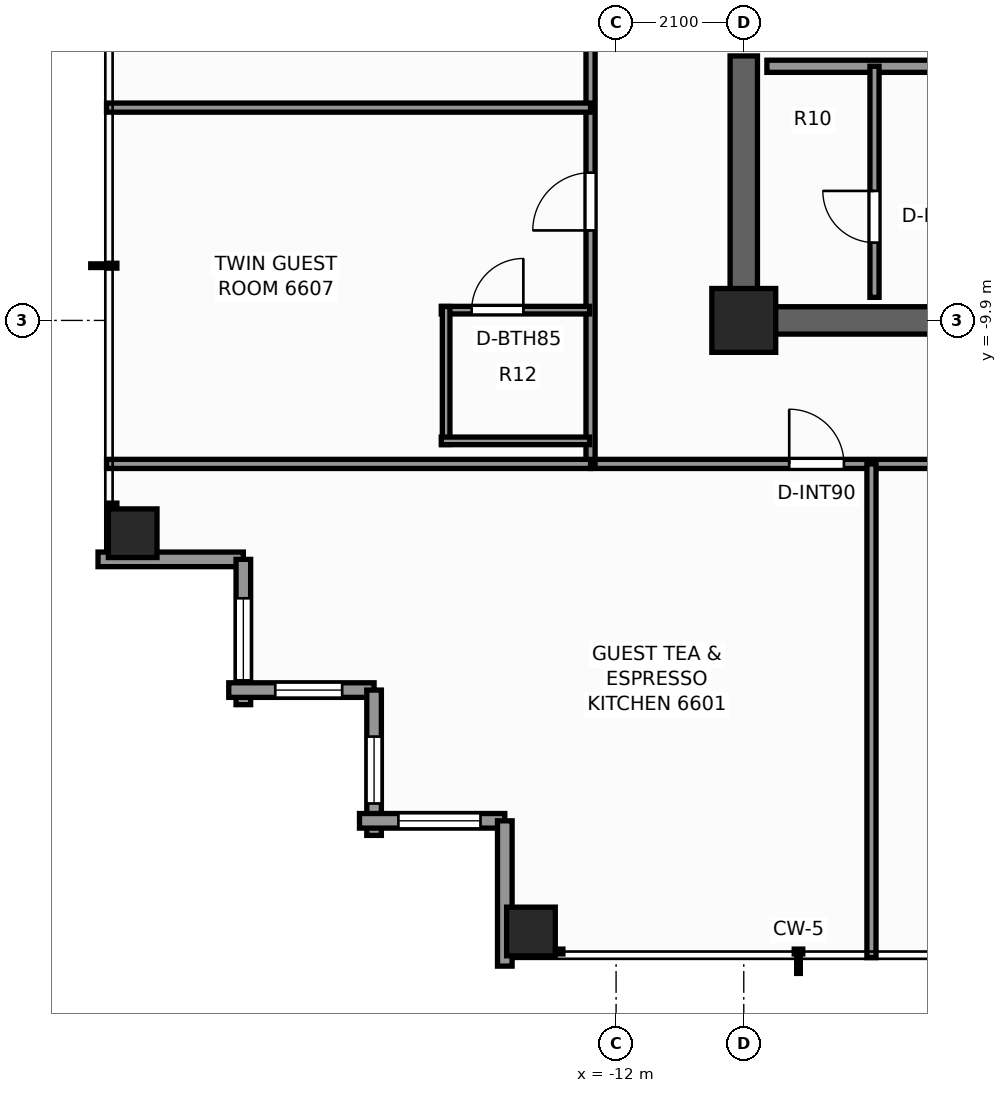
"""IFC4 building model, lengths in metres.
Left out: names, types, materials, properties, quantities, classifications, styles, units other than length and angle.
Written with IfcOpenShell. Run it as: python <this file> out.ifc"""

import sys

from ifc_helpers import new_model, si_unit, direction, frame, frame_2d, origin, origin_2d, place, context, subcontext, project, spatial, rectangle, extrude, element, fill, save


model = new_model("IFC4")
c1 = context("Model", 3, precision=1e-05, world=origin(), true_north=direction((0.0, 1.0)))
c2 = subcontext(c1, "Body", "Model", "MODEL_VIEW")
j1 = project(units=[si_unit("LENGTHUNIT", "METRE"), si_unit("PLANEANGLEUNIT", "RADIAN")], contexts=[c1])
p1 = place(None, origin())
s1 = spatial("IfcSite", under=j1, at=p1, CompositionType="ELEMENT")
p2 = place(p1, origin())
s2 = spatial("IfcBuilding", under=s1, at=p2, CompositionType="ELEMENT")
p3 = place(p2, frame((0.0, 0.0, 226.2)))
s3 = spatial("IfcBuildingStorey", under=s2, at=p3, CompositionType="ELEMENT", Elevation=226.2)
p4 = place(p3, frame((-3.54, -9.9, 0.0), z_axis=(0.0, 0.0, 1.0), x_axis=(-1.0, 0.0, 0.0)))
e1 = element("IfcWall", 1, at=p4, inside=s3, PredefinedType="SHEAR", context=c2, shape_type="SweptSolid", body=[
    extrude(rectangle(XDim=6.585, YDim=0.45, at=frame_2d((3.292, 0.0))), origin(), (0.0, 0.0, 1.0), 3.3),
])
p5 = place(p3, frame((-9.9, -9.675, 0.0), z_axis=(0.0, 0.0, 1.0), x_axis=(0.0, 1.0, 0.0)))
e2 = element("IfcWall", 2, at=p5, inside=s3, PredefinedType="SHEAR", context=c2, shape_type="SweptSolid", body=[
    extrude(rectangle(XDim=4.125, YDim=0.45, at=frame_2d((2.062, 0.0))), origin(), (0.0, 0.0, 1.0), 3.3),
])
p6 = place(p3, frame((-9.9, -9.9, 0.0), z_axis=(0.0, 0.0, 1.0), x_axis=(1.0, 0.0, 0.0)))
e3 = element("IfcColumn", 3, at=p6, inside=s3, PredefinedType="COLUMN", context=c2, shape_type="SweptSolid", body=[
    extrude(rectangle(XDim=1.05, YDim=1.05, at=origin_2d()), origin(), (0.0, 0.0, 1.0), 3.3),
])
for number, where, z_axis, x_axis in (
    (4, (-13.4, -19.95, 0.0), (0.0, 0.0, 1.0), (1.0, 0.0, 0.0)),
    (5, (-19.95, -13.4, 0.0), (0.0, 0.0, 1.0), (1.0, 0.0, 0.0)),
):
    element("IfcColumn", number, at=place(p3, frame(where, z_axis=z_axis, x_axis=x_axis)), inside=s3, PredefinedType="COLUMN", context=c2, shape_type="SweptSolid", body=[
        extrude(rectangle(XDim=0.8, YDim=0.8, at=origin_2d()), origin(), (0.0, 0.0, 1.0), 3.3),
    ])
p7 = place(p3, frame((-18.13, -13.83, 0.0), z_axis=(0.0, 0.0, 1.0), x_axis=(-1.0, 0.0, 0.0)))
e6 = element("IfcWall", 6, at=p7, inside=s3, PredefinedType="STANDARD", context=c2, shape_type="SweptSolid", body=[
    extrude(rectangle(XDim=2.39, YDim=0.24, at=frame_2d((1.195, 0.0))), origin(), (0.0, 0.0, 1.0), 2.463),
])
p8 = place(p3, frame((-18.13, -16.22, 0.0), z_axis=(0.0, 0.0, 1.0), x_axis=(0.0, 1.0, 0.0)))
e7 = element("IfcWall", 7, at=p8, inside=s3, PredefinedType="STANDARD", context=c2, shape_type="SweptSolid", body=[
    extrude(rectangle(XDim=2.39, YDim=0.24, at=frame_2d((1.195, 0.0))), origin(), (0.0, 0.0, 1.0), 2.463),
])
p9 = place(p8, frame((0.4, 0.0, 0.65)))
e8 = element("IfcOpeningElement", 8, at=p9, cuts=e7, PredefinedType="OPENING", context=c2, shape_type="SweptSolid", body=[
    extrude(rectangle(XDim=1.35, YDim=1.55, at=frame_2d((0.675, 0.775))), frame((0.0, 0.13, 0.0), z_axis=(0.0, -1.0, 0.0), x_axis=(1.0, 0.0, 0.0)), (0.0, 0.0, 1.0), 0.26),
])
p10 = place(p3, frame((-15.98, -15.98, 0.0), z_axis=(0.0, 0.0, 1.0), x_axis=(-1.0, 0.0, 0.0)))
e9 = element("IfcWall", 9, at=p10, inside=s3, PredefinedType="STANDARD", context=c2, shape_type="SweptSolid", body=[
    extrude(rectangle(XDim=2.39, YDim=0.24, at=frame_2d((1.195, 0.0))), origin(), (0.0, 0.0, 1.0), 2.463),
])
p11 = place(p10, frame((0.525, 0.0, 0.65)))
e10 = element("IfcOpeningElement", 10, at=p11, cuts=e9, PredefinedType="OPENING", context=c2, shape_type="SweptSolid", body=[
    extrude(rectangle(XDim=1.1, YDim=1.45, at=frame_2d((0.55, 0.725))), frame((0.0, 0.13, 0.0), z_axis=(0.0, -1.0, 0.0), x_axis=(1.0, 0.0, 0.0)), (0.0, 0.0, 1.0), 0.26),
])
p12 = place(p3, frame((-15.98, -18.37, 0.0), z_axis=(0.0, 0.0, 1.0), x_axis=(0.0, 1.0, 0.0)))
e11 = element("IfcWall", 11, at=p12, inside=s3, PredefinedType="STANDARD", context=c2, shape_type="SweptSolid", body=[
    extrude(rectangle(XDim=2.39, YDim=0.24, at=frame_2d((1.195, 0.0))), origin(), (0.0, 0.0, 1.0), 2.463),
])
p13 = place(p12, frame((0.525, 0.0, 0.65)))
e12 = element("IfcOpeningElement", 12, at=p13, cuts=e11, PredefinedType="OPENING", context=c2, shape_type="SweptSolid", body=[
    extrude(rectangle(XDim=1.1, YDim=1.45, at=frame_2d((0.55, 0.725))), frame((0.0, 0.13, 0.0), z_axis=(0.0, -1.0, 0.0), x_axis=(1.0, 0.0, 0.0)), (0.0, 0.0, 1.0), 0.26),
])
p14 = place(p3, frame((-13.83, -18.13, 0.0), z_axis=(0.0, 0.0, 1.0), x_axis=(-1.0, 0.0, 0.0)))
e13 = element("IfcWall", 13, at=p14, inside=s3, PredefinedType="STANDARD", context=c2, shape_type="SweptSolid", body=[
    extrude(rectangle(XDim=2.39, YDim=0.24, at=frame_2d((1.195, 0.0))), origin(), (0.0, 0.0, 1.0), 2.463),
])
p15 = place(p14, frame((0.4, 0.0, 0.65)))
e14 = element("IfcOpeningElement", 14, at=p15, cuts=e13, PredefinedType="OPENING", context=c2, shape_type="SweptSolid", body=[
    extrude(rectangle(XDim=1.35, YDim=1.55, at=frame_2d((0.675, 0.775))), frame((0.0, 0.13, 0.0), z_axis=(0.0, -1.0, 0.0), x_axis=(1.0, 0.0, 0.0)), (0.0, 0.0, 1.0), 0.26),
])
p16 = place(p3, frame((-13.83, -20.52, 0.0), z_axis=(0.0, 0.0, 1.0), x_axis=(0.0, 1.0, 0.0)))
e15 = element("IfcWall", 15, at=p16, inside=s3, PredefinedType="STANDARD", context=c2, shape_type="SweptSolid", body=[
    extrude(rectangle(XDim=2.39, YDim=0.24, at=frame_2d((1.195, 0.0))), origin(), (0.0, 0.0, 1.0), 2.463),
])
p17 = place(p3, frame((-9.52, -5.72, 0.0), z_axis=(0.0, 0.0, 1.0), x_axis=(1.0, 0.0, 0.0)))
e16 = element("IfcWall", 16, at=p17, inside=s3, PredefinedType="SOLIDWALL", context=c2, shape_type="SweptSolid", body=[
    extrude(rectangle(XDim=5.66, YDim=0.2, at=frame_2d((2.83, 0.0))), origin(), (0.0, 0.0, 1.0), 3.08),
])
p18 = place(p17, frame((2.8, 0.0, 0.0)))
e17 = element("IfcOpeningElement", 17, at=p18, cuts=e16, PredefinedType="OPENING", context=c2, shape_type="SweptSolid", body=[
    extrude(rectangle(XDim=0.95, YDim=2.06, at=frame_2d((0.475, 1.03))), frame((0.0, 0.11, 0.0), z_axis=(0.0, -1.0, 0.0), x_axis=(1.0, 0.0, 0.0)), (0.0, 0.0, 1.0), 0.22),
])
p19 = place(p3, frame((-7.75, -9.52, 0.0), z_axis=(0.0, 0.0, 1.0), x_axis=(0.0, 1.0, 0.0)))
e18 = element("IfcWall", 18, at=p19, inside=s3, PredefinedType="PARTITIONING", context=c2, shape_type="SweptSolid", body=[
    extrude(rectangle(XDim=3.8, YDim=0.15, at=frame_2d((1.9, 0.0))), origin(), (0.0, 0.0, 1.0), 3.08),
])
p20 = place(p19, frame((0.9, 0.0, 0.0)))
e19 = element("IfcOpeningElement", 19, at=p20, cuts=e18, PredefinedType="OPENING", context=c2, shape_type="SweptSolid", body=[
    extrude(rectangle(XDim=0.85, YDim=2.03, at=frame_2d((0.425, 1.015))), frame((0.0, 0.085, 0.0), z_axis=(0.0, -1.0, 0.0), x_axis=(1.0, 0.0, 0.0)), (0.0, 0.0, 1.0), 0.17),
])
p21 = place(p3, frame((-12.42, -12.26, 0.0), z_axis=(0.0, 0.0, 1.0), x_axis=(1.0, 0.0, 0.0)))
e20 = element("IfcWall", 20, at=p21, inside=s3, PredefinedType="PARTITIONING", context=c2, shape_type="SweptSolid", body=[
    extrude(rectangle(XDim=24.68, YDim=0.15, at=frame_2d((12.34, 0.0))), origin(), (0.0, 0.0, 1.0), 2.369),
])
p22 = place(p21, frame((3.267, 0.0, 0.0)))
e21 = element("IfcOpeningElement", 21, at=p22, cuts=e20, PredefinedType="OPENING", context=c2, shape_type="SweptSolid", body=[
    extrude(rectangle(XDim=0.9, YDim=2.06, at=frame_2d((0.45, 1.03))), frame((0.0, 0.085, 0.0), z_axis=(0.0, -1.0, 0.0), x_axis=(1.0, 0.0, 0.0)), (0.0, 0.0, 1.0), 0.17),
])
p23 = place(p21, frame((9.94, 0.0, 0.0)))
e22 = element("IfcOpeningElement", 22, at=p23, cuts=e20, PredefinedType="OPENING", context=c2, shape_type="SweptSolid", body=[
    extrude(rectangle(XDim=0.9, YDim=2.06, at=frame_2d((0.45, 1.03))), frame((0.0, 0.085, 0.0), z_axis=(0.0, -1.0, 0.0), x_axis=(1.0, 0.0, 0.0)), (0.0, 0.0, 1.0), 0.17),
])
p24 = place(p21, frame((15.177, 0.0, 0.0)))
e23 = element("IfcOpeningElement", 23, at=p24, cuts=e20, PredefinedType="OPENING", context=c2, shape_type="SweptSolid", body=[
    extrude(rectangle(XDim=0.9, YDim=2.06, at=frame_2d((0.45, 1.03))), frame((0.0, 0.085, 0.0), z_axis=(0.0, -1.0, 0.0), x_axis=(1.0, 0.0, 0.0)), (0.0, 0.0, 1.0), 0.17),
])
p25 = place(p21, frame((18.4, 0.0, 0.0)))
e24 = element("IfcOpeningElement", 24, at=p25, cuts=e20, PredefinedType="OPENING", context=c2, shape_type="SweptSolid", body=[
    extrude(rectangle(XDim=0.95, YDim=2.06, at=frame_2d((0.475, 1.03))), frame((0.0, 0.085, 0.0), z_axis=(0.0, -1.0, 0.0), x_axis=(1.0, 0.0, 0.0)), (0.0, 0.0, 1.0), 0.17),
])
p26 = place(p21, frame((20.85, 0.0, 0.0)))
e25 = element("IfcOpeningElement", 25, at=p26, cuts=e20, PredefinedType="OPENING", context=c2, shape_type="SweptSolid", body=[
    extrude(rectangle(XDim=0.9, YDim=2.06, at=frame_2d((0.45, 1.03))), frame((0.0, 0.085, 0.0), z_axis=(0.0, -1.0, 0.0), x_axis=(1.0, 0.0, 0.0)), (0.0, 0.0, 1.0), 0.17),
])
p27 = place(p3, frame((-12.42, -12.26, 0.0), z_axis=(0.0, 0.0, 1.0), x_axis=(0.0, 1.0, 0.0)))
e26 = element("IfcWall", 26, at=p27, inside=s3, PredefinedType="PARTITIONING", context=c2, shape_type="SweptSolid", body=[
    extrude(rectangle(XDim=24.84, YDim=0.15, at=frame_2d((12.42, 0.0))), origin(), (0.0, 0.0, 1.0), 2.369),
])
p28 = place(p27, frame((3.84, 0.0, 0.0)))
e27 = element("IfcOpeningElement", 27, at=p28, cuts=e26, PredefinedType="OPENING", context=c2, shape_type="SweptSolid", body=[
    extrude(rectangle(XDim=0.95, YDim=2.06, at=frame_2d((0.475, 1.03))), frame((0.0, 0.085, 0.0), z_axis=(0.0, -1.0, 0.0), x_axis=(1.0, 0.0, 0.0)), (0.0, 0.0, 1.0), 0.17),
])
p29 = place(p27, frame((9.738, 0.0, 0.0)))
e28 = element("IfcOpeningElement", 28, at=p29, cuts=e26, PredefinedType="OPENING", context=c2, shape_type="SweptSolid", body=[
    extrude(rectangle(XDim=0.95, YDim=2.06, at=frame_2d((0.475, 1.03))), frame((0.0, 0.085, 0.0), z_axis=(0.0, -1.0, 0.0), x_axis=(1.0, 0.0, 0.0)), (0.0, 0.0, 1.0), 0.17),
])
p30 = place(p27, frame((19.32, 0.0, 0.0)))
e29 = element("IfcOpeningElement", 29, at=p30, cuts=e26, PredefinedType="OPENING", context=c2, shape_type="SweptSolid", body=[
    extrude(rectangle(XDim=0.95, YDim=2.06, at=frame_2d((0.475, 1.03))), frame((0.0, 0.085, 0.0), z_axis=(0.0, -1.0, 0.0), x_axis=(1.0, 0.0, 0.0)), (0.0, 0.0, 1.0), 0.17),
])
p31 = place(p3, frame((-20.38, -12.26, 0.0), z_axis=(0.0, 0.0, 1.0), x_axis=(1.0, 0.0, 0.0)))
e30 = element("IfcWall", 30, at=p31, inside=s3, PredefinedType="PARTITIONING", context=c2, shape_type="SweptSolid", body=[
    extrude(rectangle(XDim=7.96, YDim=0.15, at=frame_2d((3.98, 0.0))), origin(), (0.0, 0.0, 1.0), 2.369),
])
p32 = place(p3, frame((-7.8, -20.38, 0.0), z_axis=(0.0, 0.0, 1.0), x_axis=(0.0, 1.0, 0.0)))
e31 = element("IfcWall", 31, at=p32, inside=s3, PredefinedType="PARTITIONING", context=c2, shape_type="SweptSolid", body=[
    extrude(rectangle(XDim=8.12, YDim=0.15, at=frame_2d((4.06, 0.0))), origin(), (0.0, 0.0, 1.0), 2.453),
])
p33 = place(p3, frame((-20.38, -6.4, 0.0), z_axis=(0.0, 0.0, 1.0), x_axis=(1.0, 0.0, 0.0)))
e32 = element("IfcWall", 32, at=p33, inside=s3, PredefinedType="PARTITIONING", context=c2, shape_type="SweptSolid", body=[
    extrude(rectangle(XDim=7.96, YDim=0.15, at=frame_2d((3.98, 0.0))), origin(), (0.0, 0.0, 1.0), 2.453),
])
p34 = place(p3, frame((-14.875, -9.731, 0.0), z_axis=(0.0, 0.0, 1.0), x_axis=(1.0, 0.0, 0.0)))
e33 = element("IfcWall", 33, at=p34, inside=s3, PredefinedType="PARTITIONING", context=c2, shape_type="SweptSolid", body=[
    extrude(rectangle(XDim=2.44, YDim=0.125, at=frame_2d((1.22, 0.0))), origin(), (0.0, 0.0, 1.0), 3.08),
])
p35 = place(p34, frame((0.5, 0.0, 0.0)))
e34 = element("IfcOpeningElement", 34, at=p35, cuts=e33, PredefinedType="OPENING", context=c2, shape_type="SweptSolid", body=[
    extrude(rectangle(XDim=0.85, YDim=2.03, at=frame_2d((0.425, 1.015))), frame((0.0, 0.073, 0.0), z_axis=(0.0, -1.0, 0.0), x_axis=(1.0, 0.0, 0.0)), (0.0, 0.0, 1.0), 0.145),
])
p36 = place(p3, frame((-14.795, -11.941, 0.0), z_axis=(0.0, 0.0, 1.0), x_axis=(0.0, 1.0, 0.0)))
e35 = element("IfcWall", 35, at=p36, inside=s3, PredefinedType="PARTITIONING", context=c2, shape_type="SweptSolid", body=[
    extrude(rectangle(XDim=2.27, YDim=0.125, at=frame_2d((1.135, 0.0))), origin(), (0.0, 0.0, 1.0), 2.369),
])
p37 = place(p3, frame((-14.875, -11.881, 0.0), z_axis=(0.0, 0.0, 1.0), x_axis=(1.0, 0.0, 0.0)))
e36 = element("IfcWall", 36, at=p37, inside=s3, PredefinedType="PARTITIONING", context=c2, shape_type="SweptSolid", body=[
    extrude(rectangle(XDim=2.44, YDim=0.125, at=frame_2d((1.22, 0.0))), origin(), (0.0, 0.0, 1.0), 2.369),
])
p38 = place(p9, origin())
e37 = element("IfcWindow", 37, at=p38, inside=s3, PartitioningType="SINGLE_PANEL", PredefinedType="WINDOW", context=c2, shape_type="SweptSolid", body=[
    extrude(rectangle(XDim=1.35, YDim=1.55, at=frame_2d((0.675, 0.775))), frame((0.0, 0.03, 0.0), z_axis=(0.0, -1.0, 0.0), x_axis=(1.0, 0.0, 0.0)), (0.0, 0.0, 1.0), 0.06),
])
fill(e8, e37)
p39 = place(p11, origin())
e38 = element("IfcWindow", 38, at=p39, inside=s3, PartitioningType="SINGLE_PANEL", PredefinedType="WINDOW", context=c2, shape_type="SweptSolid", body=[
    extrude(rectangle(XDim=1.1, YDim=1.45, at=frame_2d((0.55, 0.725))), frame((0.0, 0.03, 0.0), z_axis=(0.0, -1.0, 0.0), x_axis=(1.0, 0.0, 0.0)), (0.0, 0.0, 1.0), 0.06),
])
fill(e10, e38)
p40 = place(p13, origin())
e39 = element("IfcWindow", 39, at=p40, inside=s3, PartitioningType="SINGLE_PANEL", PredefinedType="WINDOW", context=c2, shape_type="SweptSolid", body=[
    extrude(rectangle(XDim=1.1, YDim=1.45, at=frame_2d((0.55, 0.725))), frame((0.0, 0.03, 0.0), z_axis=(0.0, -1.0, 0.0), x_axis=(1.0, 0.0, 0.0)), (0.0, 0.0, 1.0), 0.06),
])
fill(e12, e39)
p41 = place(p15, origin())
e40 = element("IfcWindow", 40, at=p41, inside=s3, PartitioningType="SINGLE_PANEL", PredefinedType="WINDOW", context=c2, shape_type="SweptSolid", body=[
    extrude(rectangle(XDim=1.35, YDim=1.55, at=frame_2d((0.675, 0.775))), frame((0.0, 0.03, 0.0), z_axis=(0.0, -1.0, 0.0), x_axis=(1.0, 0.0, 0.0)), (0.0, 0.0, 1.0), 0.06),
])
fill(e14, e40)
p42 = place(p20, origin())
e41 = element("IfcDoor", 41, at=p42, inside=s3, OperationType="SINGLE_SWING_RIGHT", PredefinedType="DOOR", context=c2, shape_type="SweptSolid", body=[
    extrude(rectangle(XDim=0.85, YDim=2.03, at=frame_2d((0.425, 1.015))), frame((0.0, 0.025, 0.0), z_axis=(0.0, -1.0, 0.0), x_axis=(1.0, 0.0, 0.0)), (0.0, 0.0, 1.0), 0.05),
])
fill(e19, e41)
p43 = place(p22, origin())
e42 = element("IfcDoor", 42, at=p43, inside=s3, OperationType="SINGLE_SWING_LEFT", PredefinedType="DOOR", context=c2, shape_type="SweptSolid", body=[
    extrude(rectangle(XDim=0.9, YDim=2.06, at=frame_2d((0.45, 1.03))), frame((0.0, 0.025, 0.0), z_axis=(0.0, -1.0, 0.0), x_axis=(1.0, 0.0, 0.0)), (0.0, 0.0, 1.0), 0.05),
])
fill(e21, e42)
p44 = place(p35, origin())
e43 = element("IfcDoor", 43, at=p44, inside=s3, OperationType="SINGLE_SWING_RIGHT", PredefinedType="DOOR", context=c2, shape_type="SweptSolid", body=[
    extrude(rectangle(XDim=0.85, YDim=2.03, at=frame_2d((0.425, 1.015))), frame((0.0, 0.025, 0.0), z_axis=(0.0, -1.0, 0.0), x_axis=(1.0, 0.0, 0.0)), (0.0, 0.0, 1.0), 0.05),
])
fill(e34, e43)
p45 = place(p28, origin())
e44 = element("IfcDoor", 44, at=p45, inside=s3, OperationType="SINGLE_SWING_LEFT", PredefinedType="DOOR", context=c2, shape_type="SweptSolid", body=[
    extrude(rectangle(XDim=0.95, YDim=2.06, at=frame_2d((0.475, 1.03))), frame((0.0, 0.025, 0.0), z_axis=(0.0, -1.0, 0.0), x_axis=(1.0, 0.0, 0.0)), (0.0, 0.0, 1.0), 0.05),
])
fill(e27, e44)
save(model, sys.argv[1])
